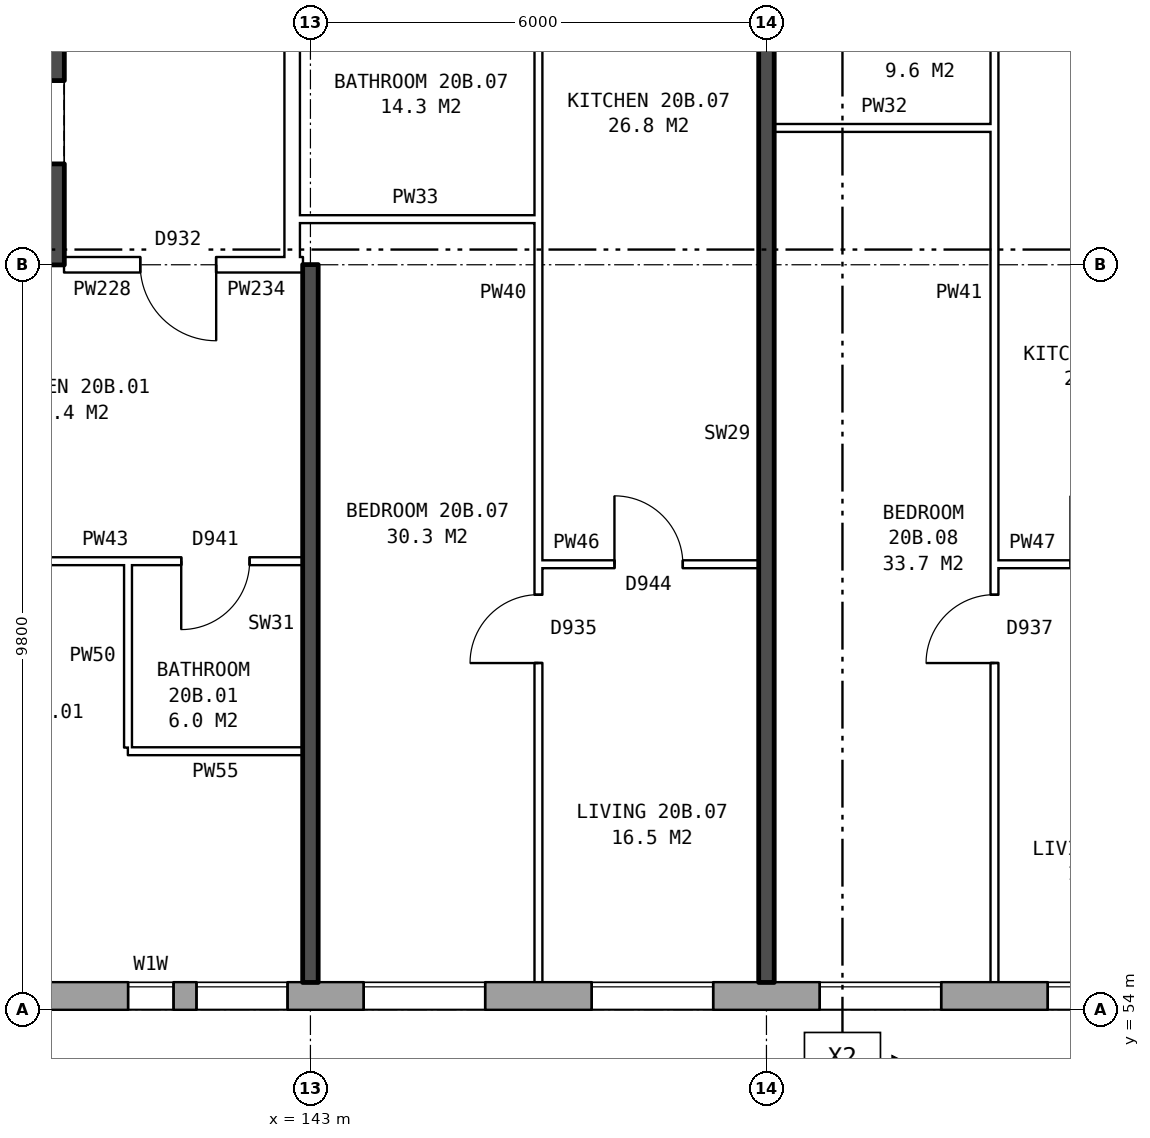
"""IFC4 building model, lengths in metres.
Left out: names, types, materials, properties, quantities, classifications, styles, units other than length and angle.
Written with IfcOpenShell. Run it as: python <this file> out.ifc"""

import sys

from ifc_helpers import new_model, si_unit, direction, frame, frame_2d, origin, place, context, subcontext, project, spatial, rectangle, extrude, element, fill, save


model = new_model("IFC4")
c1 = context("Model", 3, precision=1e-05, world=origin(), true_north=direction((0.0, 1.0)))
c2 = subcontext(c1, "Body", "Model", "MODEL_VIEW")
j1 = project(units=[si_unit("LENGTHUNIT", "METRE"), si_unit("PLANEANGLEUNIT", "RADIAN")], contexts=[c1])
p1 = place(None, origin())
s1 = spatial("IfcSite", under=j1, at=p1, CompositionType="ELEMENT")
p2 = place(p1, origin())
s2 = spatial("IfcBuilding", under=s1, at=p2, CompositionType="ELEMENT")
p3 = place(p2, frame((0.0, 0.0, 74.7)))
s3 = spatial("IfcBuildingStorey", under=s2, at=p3, CompositionType="ELEMENT", Elevation=74.7)
p4 = place(p3, frame((134.075, 54.18, 0.0), z_axis=(0.0, 0.0, 1.0), x_axis=(1.0, 0.0, 0.0)))
e1 = element("IfcWall", 1, at=p4, inside=s3, PredefinedType="STANDARD", context=c2, shape_type="SweptSolid", body=[
    extrude(rectangle(XDim=38.101, YDim=0.36, at=frame_2d((19.05, 0.0))), origin(), (0.0, 0.0, 1.0), 2.85),
])
p5 = place(p4, frame((0.625, 0.0, 0.8)))
e2 = element("IfcOpeningElement", 2, at=p5, cuts=e1, PredefinedType="OPENING", context=c2, shape_type="SweptSolid", body=[
    extrude(rectangle(XDim=1.6, YDim=1.8, at=frame_2d((0.8, 0.9))), frame((0.0, 0.19, 0.0), z_axis=(0.0, -1.0, 0.0), x_axis=(1.0, 0.0, 0.0)), (0.0, 0.0, 1.0), 0.38),
])
p6 = place(p4, frame((3.125, 0.0, 0.8)))
e3 = element("IfcOpeningElement", 3, at=p6, cuts=e1, PredefinedType="OPENING", context=c2, shape_type="SweptSolid", body=[
    extrude(rectangle(XDim=1.2, YDim=1.8, at=frame_2d((0.6, 0.9))), frame((0.0, 0.19, 0.0), z_axis=(0.0, -1.0, 0.0), x_axis=(1.0, 0.0, 0.0)), (0.0, 0.0, 1.0), 0.38),
])
p7 = place(p4, frame((4.625, 0.0, 1.6)))
e4 = element("IfcOpeningElement", 4, at=p7, cuts=e1, PredefinedType="OPENING", context=c2, shape_type="SweptSolid", body=[
    extrude(rectangle(XDim=0.6, YDim=0.9, at=frame_2d((0.3, 0.45))), frame((0.0, 0.19, 0.0), z_axis=(0.0, -1.0, 0.0), x_axis=(1.0, 0.0, 0.0)), (0.0, 0.0, 1.0), 0.38),
])
p8 = place(p4, frame((9.625, 0.0, 0.8)))
e5 = element("IfcOpeningElement", 5, at=p8, cuts=e1, PredefinedType="OPENING", context=c2, shape_type="SweptSolid", body=[
    extrude(rectangle(XDim=1.6, YDim=1.8, at=frame_2d((0.8, 0.9))), frame((0.0, 0.19, 0.0), z_axis=(0.0, -1.0, 0.0), x_axis=(1.0, 0.0, 0.0)), (0.0, 0.0, 1.0), 0.38),
])
p9 = place(p4, frame((12.625, 0.0, 0.8)))
e6 = element("IfcOpeningElement", 6, at=p9, cuts=e1, PredefinedType="OPENING", context=c2, shape_type="SweptSolid", body=[
    extrude(rectangle(XDim=1.6, YDim=1.8, at=frame_2d((0.8, 0.9))), frame((0.0, 0.19, 0.0), z_axis=(0.0, -1.0, 0.0), x_axis=(1.0, 0.0, 0.0)), (0.0, 0.0, 1.0), 0.38),
])
p10 = place(p4, frame((15.625, 0.0, 0.8)))
e7 = element("IfcOpeningElement", 7, at=p10, cuts=e1, PredefinedType="OPENING", context=c2, shape_type="SweptSolid", body=[
    extrude(rectangle(XDim=1.6, YDim=1.8, at=frame_2d((0.8, 0.9))), frame((0.0, 0.19, 0.0), z_axis=(0.0, -1.0, 0.0), x_axis=(1.0, 0.0, 0.0)), (0.0, 0.0, 1.0), 0.38),
])
p11 = place(p4, frame((18.625, 0.0, 0.8)))
e8 = element("IfcOpeningElement", 8, at=p11, cuts=e1, PredefinedType="OPENING", context=c2, shape_type="SweptSolid", body=[
    extrude(rectangle(XDim=1.6, YDim=1.8, at=frame_2d((0.8, 0.9))), frame((0.0, 0.19, 0.0), z_axis=(0.0, -1.0, 0.0), x_axis=(1.0, 0.0, 0.0)), (0.0, 0.0, 1.0), 0.38),
])
p12 = place(p4, frame((21.625, 0.0, 0.8)))
e9 = element("IfcOpeningElement", 9, at=p12, cuts=e1, PredefinedType="OPENING", context=c2, shape_type="SweptSolid", body=[
    extrude(rectangle(XDim=1.6, YDim=1.8, at=frame_2d((0.8, 0.9))), frame((0.0, 0.19, 0.0), z_axis=(0.0, -1.0, 0.0), x_axis=(1.0, 0.0, 0.0)), (0.0, 0.0, 1.0), 0.38),
])
p13 = place(p4, frame((24.625, 0.0, 0.8)))
e10 = element("IfcOpeningElement", 10, at=p13, cuts=e1, PredefinedType="OPENING", context=c2, shape_type="SweptSolid", body=[
    extrude(rectangle(XDim=1.6, YDim=1.8, at=frame_2d((0.8, 0.9))), frame((0.0, 0.19, 0.0), z_axis=(0.0, -1.0, 0.0), x_axis=(1.0, 0.0, 0.0)), (0.0, 0.0, 1.0), 0.38),
])
p14 = place(p4, frame((27.625, 0.0, 0.8)))
e11 = element("IfcOpeningElement", 11, at=p14, cuts=e1, PredefinedType="OPENING", context=c2, shape_type="SweptSolid", body=[
    extrude(rectangle(XDim=1.6, YDim=1.8, at=frame_2d((0.8, 0.9))), frame((0.0, 0.19, 0.0), z_axis=(0.0, -1.0, 0.0), x_axis=(1.0, 0.0, 0.0)), (0.0, 0.0, 1.0), 0.38),
])
p15 = place(p4, frame((29.525, 0.0, 0.8)))
e12 = element("IfcOpeningElement", 12, at=p15, cuts=e1, PredefinedType="OPENING", context=c2, shape_type="SweptSolid", body=[
    extrude(rectangle(XDim=1.0, YDim=1.8, at=frame_2d((0.5, 0.9))), frame((0.0, 0.19, 0.0), z_axis=(0.0, -1.0, 0.0), x_axis=(1.0, 0.0, 0.0)), (0.0, 0.0, 1.0), 0.38),
])
p16 = place(p4, frame((33.625, 0.0, 0.8)))
e13 = element("IfcOpeningElement", 13, at=p16, cuts=e1, PredefinedType="OPENING", context=c2, shape_type="SweptSolid", body=[
    extrude(rectangle(XDim=1.6, YDim=1.8, at=frame_2d((0.8, 0.9))), frame((0.0, 0.19, 0.0), z_axis=(0.0, -1.0, 0.0), x_axis=(1.0, 0.0, 0.0)), (0.0, 0.0, 1.0), 0.38),
])
p17 = place(p4, frame((6.525, 0.0, 0.8)))
e14 = element("IfcOpeningElement", 14, at=p17, cuts=e1, PredefinedType="OPENING", context=c2, shape_type="SweptSolid", body=[
    extrude(rectangle(XDim=0.6, YDim=0.9, at=frame_2d((0.3, 0.45))), frame((0.0, 0.19, 0.0), z_axis=(0.0, -1.0, 0.0), x_axis=(1.0, 0.0, 0.0)), (0.0, 0.0, 1.0), 0.38),
])
p18 = place(p4, frame((7.425, 0.0, 0.8)))
e15 = element("IfcOpeningElement", 15, at=p18, cuts=e1, PredefinedType="OPENING", context=c2, shape_type="SweptSolid", body=[
    extrude(rectangle(XDim=1.2, YDim=1.8, at=frame_2d((0.6, 0.9))), frame((0.0, 0.19, 0.0), z_axis=(0.0, -1.0, 0.0), x_axis=(1.0, 0.0, 0.0)), (0.0, 0.0, 1.0), 0.38),
])
p19 = place(p4, frame((30.825, 0.0, 0.8)))
e16 = element("IfcOpeningElement", 16, at=p19, cuts=e1, PredefinedType="OPENING", context=c2, shape_type="SweptSolid", body=[
    extrude(rectangle(XDim=0.6, YDim=0.9, at=frame_2d((0.3, 0.45))), frame((0.0, 0.19, 0.0), z_axis=(0.0, -1.0, 0.0), x_axis=(1.0, 0.0, 0.0)), (0.0, 0.0, 1.0), 0.38),
])
p20 = place(p3, frame((139.41, 64.5, 0.0), z_axis=(0.0, 0.0, 1.0), x_axis=(0.0, 1.0, 0.0)))
e17 = element("IfcWall", 17, at=p20, inside=s3, PredefinedType="SHEAR", context=c2, shape_type="SweptSolid", body=[
    extrude(rectangle(XDim=11.0, YDim=0.7, at=frame_2d((5.5, 0.0))), origin(), (0.0, 0.0, 1.0), 2.85),
])
p21 = place(p20, frame((0.625, 0.0, 0.0)))
e18 = element("IfcOpeningElement", 18, at=p21, cuts=e17, PredefinedType="OPENING", context=c2, shape_type="SweptSolid", body=[
    extrude(rectangle(XDim=1.1, YDim=2.1, at=frame_2d((0.55, 1.05))), frame((0.0, 0.36, 0.0), z_axis=(0.0, -1.0, 0.0), x_axis=(1.0, 0.0, 0.0)), (0.0, 0.0, 1.0), 0.72),
])
p22 = place(p20, frame((9.2, 0.0, 0.0)))
e19 = element("IfcOpeningElement", 19, at=p22, cuts=e17, PredefinedType="OPENING", context=c2, shape_type="SweptSolid", body=[
    extrude(rectangle(XDim=1.1, YDim=2.1, at=frame_2d((0.55, 1.05))), frame((0.0, 0.36, 0.0), z_axis=(0.0, -1.0, 0.0), x_axis=(1.0, 0.0, 0.0)), (0.0, 0.0, 1.0), 0.72),
])
p23 = place(p20, frame((7.425, 0.0, 0.0)))
e20 = element("IfcOpeningElement", 20, at=p23, cuts=e17, PredefinedType="OPENING", context=c2, shape_type="SweptSolid", body=[
    extrude(rectangle(XDim=0.85, YDim=2.1, at=frame_2d((0.425, 1.05))), frame((0.0, 0.36, 0.0), z_axis=(0.0, -1.0, 0.0), x_axis=(1.0, 0.0, 0.0)), (0.0, 0.0, 1.0), 0.72),
])
p24 = place(p3, frame((139.76, 64.15, 0.0), z_axis=(0.0, 0.0, 1.0), x_axis=(-1.0, 0.0, 0.0)))
e21 = element("IfcWall", 21, at=p24, inside=s3, PredefinedType="SHEAR", context=c2, shape_type="SweptSolid", body=[
    extrude(rectangle(XDim=8.4, YDim=0.7, at=frame_2d((4.2, 0.0))), origin(), (0.0, 0.0, 1.0), 2.85),
])
p25 = place(p3, frame((142.76, 63.9, 0.0), z_axis=(0.0, 0.0, 1.0), x_axis=(0.0, 1.0, 0.0)))
e22 = element("IfcWall", 22, at=p25, inside=s3, PredefinedType="PARTITIONING", context=c2, shape_type="SweptSolid", body=[
    extrude(rectangle(XDim=12.2, YDim=0.2, at=frame_2d((6.1, 0.0))), origin(), (0.0, 0.0, 1.0), 2.85),
])
p26 = place(p25, frame((5.1, 0.0, 0.0)))
e23 = element("IfcOpeningElement", 23, at=p26, cuts=e22, PredefinedType="OPENING", context=c2, shape_type="SweptSolid", body=[
    extrude(rectangle(XDim=2.0, YDim=2.1, at=frame_2d((1.0, 1.05))), frame((0.0, 0.11, 0.0), z_axis=(0.0, -1.0, 0.0), x_axis=(1.0, 0.0, 0.0)), (0.0, 0.0, 1.0), 0.22),
])
p27 = place(p3, frame((140.6, 57.4, 0.0), z_axis=(0.0, 0.0, 1.0), x_axis=(1.0, 0.0, 0.0)))
e24 = element("IfcWall", 24, at=p27, inside=s3, PredefinedType="PARTITIONING", context=c2, shape_type="SweptSolid", body=[
    extrude(rectangle(XDim=2.3, YDim=0.1, at=frame_2d((1.15, 0.0))), origin(), (0.0, 0.0, 1.0), 2.85),
])
p28 = place(p3, frame((146.0, 59.86, 0.0), z_axis=(0.0, 0.0, 1.0), x_axis=(1.0, 0.0, 0.0)))
e25 = element("IfcWall", 25, at=p28, inside=s3, PredefinedType="PARTITIONING", context=c2, shape_type="SweptSolid", body=[
    extrude(rectangle(XDim=2.9, YDim=0.1, at=frame_2d((1.45, 0.0))), origin(), (0.0, 0.0, 1.0), 2.85),
])
p29 = place(p28, frame((1.0, 0.0, 0.0)))
e26 = element("IfcOpeningElement", 26, at=p29, cuts=e25, PredefinedType="OPENING", context=c2, shape_type="SweptSolid", body=[
    extrude(rectangle(XDim=0.9, YDim=2.1, at=frame_2d((0.45, 1.05))), frame((0.0, 0.06, 0.0), z_axis=(0.0, -1.0, 0.0), x_axis=(1.0, 0.0, 0.0)), (0.0, 0.0, 1.0), 0.12),
])
p30 = place(p3, frame((152.0, 59.86, 0.0), z_axis=(0.0, 0.0, 1.0), x_axis=(1.0, 0.0, 0.0)))
e27 = element("IfcWall", 27, at=p30, inside=s3, PredefinedType="PARTITIONING", context=c2, shape_type="SweptSolid", body=[
    extrude(rectangle(XDim=2.9, YDim=0.1, at=frame_2d((1.45, 0.0))), origin(), (0.0, 0.0, 1.0), 2.85),
])
p31 = place(p30, frame((1.0, 0.0, 0.0)))
e28 = element("IfcOpeningElement", 28, at=p31, cuts=e27, PredefinedType="OPENING", context=c2, shape_type="SweptSolid", body=[
    extrude(rectangle(XDim=0.9, YDim=2.1, at=frame_2d((0.45, 1.05))), frame((0.0, 0.06, 0.0), z_axis=(0.0, -1.0, 0.0), x_axis=(1.0, 0.0, 0.0)), (0.0, 0.0, 1.0), 0.12),
])
p32 = place(p3, frame((137.1, 59.9, 0.0), z_axis=(0.0, 0.0, 1.0), x_axis=(1.0, 0.0, 0.0)))
e29 = element("IfcWall", 29, at=p32, inside=s3, PredefinedType="PARTITIONING", context=c2, shape_type="SweptSolid", body=[
    extrude(rectangle(XDim=5.8, YDim=0.1, at=frame_2d((2.9, 0.0))), origin(), (0.0, 0.0, 1.0), 2.85),
])
p33 = place(p32, frame((1.3, 0.0, 0.0)))
e30 = element("IfcOpeningElement", 30, at=p33, cuts=e29, PredefinedType="OPENING", context=c2, shape_type="SweptSolid", body=[
    extrude(rectangle(XDim=0.9, YDim=2.1, at=frame_2d((0.45, 1.05))), frame((0.0, 0.06, 0.0), z_axis=(0.0, -1.0, 0.0), x_axis=(1.0, 0.0, 0.0)), (0.0, 0.0, 1.0), 0.12),
])
p34 = place(p32, frame((4.2, 0.0, 0.0)))
e31 = element("IfcOpeningElement", 31, at=p34, cuts=e29, PredefinedType="OPENING", context=c2, shape_type="SweptSolid", body=[
    extrude(rectangle(XDim=0.9, YDim=2.1, at=frame_2d((0.45, 1.05))), frame((0.0, 0.06, 0.0), z_axis=(0.0, -1.0, 0.0), x_axis=(1.0, 0.0, 0.0)), (0.0, 0.0, 1.0), 0.12),
])
p35 = place(p3, frame((139.76, 63.8, 0.0), z_axis=(0.0, 0.0, 1.0), x_axis=(1.0, 0.0, 0.0)))
e32 = element("IfcWall", 32, at=p35, inside=s3, PredefinedType="PARTITIONING", context=c2, shape_type="SweptSolid", body=[
    extrude(rectangle(XDim=3.0, YDim=0.2, at=frame_2d((1.5, 0.0))), origin(), (0.0, 0.0, 1.0), 2.85),
])
p36 = place(p35, frame((1.0, 0.0, 0.0)))
e33 = element("IfcOpeningElement", 33, at=p36, cuts=e32, PredefinedType="OPENING", context=c2, shape_type="SweptSolid", body=[
    extrude(rectangle(XDim=1.0, YDim=2.1, at=frame_2d((0.5, 1.05))), frame((0.0, 0.11, 0.0), z_axis=(0.0, -1.0, 0.0), x_axis=(1.0, 0.0, 0.0)), (0.0, 0.0, 1.0), 0.22),
])
p37 = place(p3, frame((142.76, 63.8, 0.0), z_axis=(0.0, 0.0, 1.0), x_axis=(1.0, 0.0, 0.0)))
e34 = element("IfcWall", 34, at=p37, inside=s3, PredefinedType="PARTITIONING", context=c2, shape_type="SweptSolid", body=[
    extrude(rectangle(XDim=0.14, YDim=0.2, at=frame_2d((0.07, 0.0))), origin(), (0.0, 0.0, 1.0), 2.85),
])
p38 = place(p3, frame((142.76, 64.4, 0.0), z_axis=(0.0, 0.0, 1.0), x_axis=(1.0, 0.0, 0.0)))
e35 = element("IfcWall", 35, at=p38, inside=s3, PredefinedType="PARTITIONING", context=c2, shape_type="SweptSolid", body=[
    extrude(rectangle(XDim=3.24, YDim=0.1, at=frame_2d((1.62, 0.0))), origin(), (0.0, 0.0, 1.0), 2.85),
])
p39 = place(p3, frame((149.1, 65.6, 0.0), z_axis=(0.0, 0.0, 1.0), x_axis=(1.0, 0.0, 0.0)))
e36 = element("IfcWall", 36, at=p39, inside=s3, PredefinedType="PARTITIONING", context=c2, shape_type="SweptSolid", body=[
    extrude(rectangle(XDim=2.9, YDim=0.1, at=frame_2d((1.45, 0.0))), origin(), (0.0, 0.0, 1.0), 2.85),
])
p40 = place(p3, frame((140.6, 57.45, 0.0), z_axis=(0.0, 0.0, 1.0), x_axis=(0.0, 1.0, 0.0)))
e37 = element("IfcWall", 37, at=p40, inside=s3, PredefinedType="PARTITIONING", context=c2, shape_type="SweptSolid", body=[
    extrude(rectangle(XDim=2.4, YDim=0.1, at=frame_2d((1.2, 0.0))), origin(), (0.0, 0.0, 1.0), 2.85),
])
p41 = place(p3, frame((143.0, 54.36, 0.0), z_axis=(0.0, 0.0, 1.0), x_axis=(0.0, 1.0, 0.0)))
e38 = element("IfcWall", 38, at=p41, inside=s3, PredefinedType="SOLIDWALL", context=c2, shape_type="SweptSolid", body=[
    extrude(rectangle(XDim=9.44, YDim=0.2, at=frame_2d((4.72, 0.0))), origin(), (0.0, 0.0, 1.0), 2.85),
])
p42 = place(p3, frame((146.0, 54.36, 0.0), z_axis=(0.0, 0.0, 1.0), x_axis=(0.0, 1.0, 0.0)))
e39 = element("IfcWall", 39, at=p42, inside=s3, PredefinedType="PARTITIONING", context=c2, shape_type="SweptSolid", body=[
    extrude(rectangle(XDim=14.34, YDim=0.1, at=frame_2d((7.17, 0.0))), origin(), (0.0, 0.0, 1.0), 2.85),
])
p43 = place(p42, frame((4.2, 0.0, 0.0)))
e40 = element("IfcOpeningElement", 40, at=p43, cuts=e39, PredefinedType="OPENING", context=c2, shape_type="SweptSolid", body=[
    extrude(rectangle(XDim=0.9, YDim=2.1, at=frame_2d((0.45, 1.05))), frame((0.0, 0.06, 0.0), z_axis=(0.0, -1.0, 0.0), x_axis=(1.0, 0.0, 0.0)), (0.0, 0.0, 1.0), 0.12),
])
p44 = place(p42, frame((13.04, 0.0, 0.0)))
e41 = element("IfcOpeningElement", 41, at=p44, cuts=e39, PredefinedType="OPENING", context=c2, shape_type="SweptSolid", body=[
    extrude(rectangle(XDim=0.9, YDim=2.1, at=frame_2d((0.45, 1.05))), frame((0.0, 0.06, 0.0), z_axis=(0.0, -1.0, 0.0), x_axis=(1.0, 0.0, 0.0)), (0.0, 0.0, 1.0), 0.12),
])
p45 = place(p3, frame((149.0, 54.36, 0.0), z_axis=(0.0, 0.0, 1.0), x_axis=(0.0, 1.0, 0.0)))
e42 = element("IfcWall", 42, at=p45, inside=s3, PredefinedType="SOLIDWALL", context=c2, shape_type="SweptSolid", body=[
    extrude(rectangle(XDim=14.44, YDim=0.2, at=frame_2d((7.22, 0.0))), origin(), (0.0, 0.0, 1.0), 2.85),
])
p46 = place(p3, frame((152.0, 54.36, 0.0), z_axis=(0.0, 0.0, 1.0), x_axis=(0.0, 1.0, 0.0)))
e43 = element("IfcWall", 43, at=p46, inside=s3, PredefinedType="PARTITIONING", context=c2, shape_type="SweptSolid", body=[
    extrude(rectangle(XDim=14.34, YDim=0.1, at=frame_2d((7.17, 0.0))), origin(), (0.0, 0.0, 1.0), 2.85),
])
p47 = place(p46, frame((4.2, 0.0, 0.0)))
e44 = element("IfcOpeningElement", 44, at=p47, cuts=e43, PredefinedType="OPENING", context=c2, shape_type="SweptSolid", body=[
    extrude(rectangle(XDim=0.9, YDim=2.1, at=frame_2d((0.45, 1.05))), frame((0.0, 0.06, 0.0), z_axis=(0.0, -1.0, 0.0), x_axis=(1.0, 0.0, 0.0)), (0.0, 0.0, 1.0), 0.12),
])
p48 = place(p46, frame((13.04, 0.0, 0.0)))
e45 = element("IfcOpeningElement", 45, at=p48, cuts=e43, PredefinedType="OPENING", context=c2, shape_type="SweptSolid", body=[
    extrude(rectangle(XDim=0.9, YDim=2.1, at=frame_2d((0.45, 1.05))), frame((0.0, 0.06, 0.0), z_axis=(0.0, -1.0, 0.0), x_axis=(1.0, 0.0, 0.0)), (0.0, 0.0, 1.0), 0.12),
])
p49 = place(p8, origin())
e46 = element("IfcWindow", 46, at=p49, inside=s3, PartitioningType="SINGLE_PANEL", PredefinedType="WINDOW", context=c2, shape_type="SweptSolid", body=[
    extrude(rectangle(XDim=1.6, YDim=1.8, at=frame_2d((0.8, 0.9))), frame((0.0, 0.15, 0.0), z_axis=(0.0, -1.0, 0.0), x_axis=(1.0, 0.0, 0.0)), (0.0, 0.0, 1.0), 0.06),
])
fill(e5, e46)
p50 = place(p9, origin())
e47 = element("IfcWindow", 47, at=p50, inside=s3, PartitioningType="SINGLE_PANEL", PredefinedType="WINDOW", context=c2, shape_type="SweptSolid", body=[
    extrude(rectangle(XDim=1.6, YDim=1.8, at=frame_2d((0.8, 0.9))), frame((0.0, 0.15, 0.0), z_axis=(0.0, -1.0, 0.0), x_axis=(1.0, 0.0, 0.0)), (0.0, 0.0, 1.0), 0.06),
])
fill(e6, e47)
p51 = place(p10, origin())
e48 = element("IfcWindow", 48, at=p51, inside=s3, PartitioningType="SINGLE_PANEL", PredefinedType="WINDOW", context=c2, shape_type="SweptSolid", body=[
    extrude(rectangle(XDim=1.6, YDim=1.8, at=frame_2d((0.8, 0.9))), frame((0.0, 0.15, 0.0), z_axis=(0.0, -1.0, 0.0), x_axis=(1.0, 0.0, 0.0)), (0.0, 0.0, 1.0), 0.06),
])
fill(e7, e48)
p52 = place(p11, origin())
e49 = element("IfcWindow", 49, at=p52, inside=s3, PartitioningType="SINGLE_PANEL", PredefinedType="WINDOW", context=c2, shape_type="SweptSolid", body=[
    extrude(rectangle(XDim=1.6, YDim=1.8, at=frame_2d((0.8, 0.9))), frame((0.0, 0.15, 0.0), z_axis=(0.0, -1.0, 0.0), x_axis=(1.0, 0.0, 0.0)), (0.0, 0.0, 1.0), 0.06),
])
fill(e8, e49)
p53 = place(p36, frame((1.0, 0.0, 0.0), z_axis=(0.0, 0.0, 1.0), x_axis=(-1.0, 0.0, 0.0)))
e50 = element("IfcDoor", 50, at=p53, inside=s3, OperationType="SINGLE_SWING_LEFT", PredefinedType="DOOR", context=c2, shape_type="SweptSolid", body=[
    extrude(rectangle(XDim=1.0, YDim=2.1, at=frame_2d((0.5, 1.05))), frame((0.0, 0.025, 0.0), z_axis=(0.0, -1.0, 0.0), x_axis=(1.0, 0.0, 0.0)), (0.0, 0.0, 1.0), 0.05),
])
fill(e33, e50)
p54 = place(p34, frame((0.9, 0.0, 0.0), z_axis=(0.0, 0.0, 1.0), x_axis=(-1.0, 0.0, 0.0)))
e51 = element("IfcDoor", 51, at=p54, inside=s3, OperationType="SINGLE_SWING_RIGHT", PredefinedType="DOOR", context=c2, shape_type="SweptSolid", body=[
    extrude(rectangle(XDim=0.9, YDim=2.1, at=frame_2d((0.45, 1.05))), frame((0.0, 0.025, 0.0), z_axis=(0.0, -1.0, 0.0), x_axis=(1.0, 0.0, 0.0)), (0.0, 0.0, 1.0), 0.05),
])
fill(e31, e51)
p55 = place(p43, origin())
e52 = element("IfcDoor", 52, at=p55, inside=s3, OperationType="SINGLE_SWING_LEFT", PredefinedType="DOOR", context=c2, shape_type="SweptSolid", body=[
    extrude(rectangle(XDim=0.9, YDim=2.1, at=frame_2d((0.45, 1.05))), frame((0.0, 0.025, 0.0), z_axis=(0.0, -1.0, 0.0), x_axis=(1.0, 0.0, 0.0)), (0.0, 0.0, 1.0), 0.05),
])
fill(e40, e52)
p56 = place(p29, origin())
e53 = element("IfcDoor", 53, at=p56, inside=s3, OperationType="SINGLE_SWING_LEFT", PredefinedType="DOOR", context=c2, shape_type="SweptSolid", body=[
    extrude(rectangle(XDim=0.9, YDim=2.1, at=frame_2d((0.45, 1.05))), frame((0.0, 0.025, 0.0), z_axis=(0.0, -1.0, 0.0), x_axis=(1.0, 0.0, 0.0)), (0.0, 0.0, 1.0), 0.05),
])
fill(e26, e53)
p57 = place(p47, origin())
e54 = element("IfcDoor", 54, at=p57, inside=s3, OperationType="SINGLE_SWING_LEFT", PredefinedType="DOOR", context=c2, shape_type="SweptSolid", body=[
    extrude(rectangle(XDim=0.9, YDim=2.1, at=frame_2d((0.45, 1.05))), frame((0.0, 0.025, 0.0), z_axis=(0.0, -1.0, 0.0), x_axis=(1.0, 0.0, 0.0)), (0.0, 0.0, 1.0), 0.05),
])
fill(e44, e54)
p58 = place(p17, origin())
e55 = element("IfcWindow", 55, at=p58, inside=s3, PartitioningType="SINGLE_PANEL", PredefinedType="WINDOW", context=c2, shape_type="SweptSolid", body=[
    extrude(rectangle(XDim=0.6, YDim=0.9, at=frame_2d((0.3, 0.45))), frame((0.0, 0.15, 0.0), z_axis=(0.0, -1.0, 0.0), x_axis=(1.0, 0.0, 0.0)), (0.0, 0.0, 1.0), 0.06),
])
fill(e14, e55)
p59 = place(p18, origin())
e56 = element("IfcWindow", 56, at=p59, inside=s3, PartitioningType="SINGLE_PANEL", PredefinedType="WINDOW", context=c2, shape_type="SweptSolid", body=[
    extrude(rectangle(XDim=1.2, YDim=1.8, at=frame_2d((0.6, 0.9))), frame((0.0, 0.15, 0.0), z_axis=(0.0, -1.0, 0.0), x_axis=(1.0, 0.0, 0.0)), (0.0, 0.0, 1.0), 0.06),
])
fill(e15, e56)
save(model, sys.argv[1])
